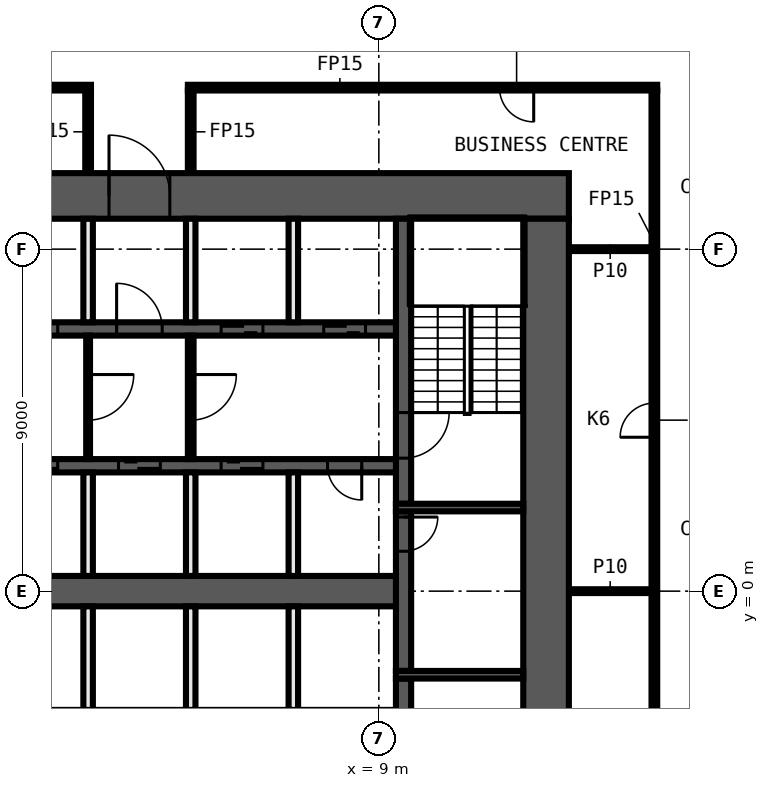
"""IFC4 building model, lengths in metres.
Left out: names, types, materials, properties, quantities, classifications, styles, units other than length and angle.
Written with IfcOpenShell. Run it as: python <this file> out.ifc"""

import sys

from ifc_helpers import new_model, si_unit, direction, frame, frame_2d, origin, place, context, subcontext, project, spatial, rectangle, extrude, element, fill, save


model = new_model("IFC4")
c1 = context("Model", 3, precision=1e-05, world=origin(), true_north=direction((0.0, 1.0)))
c2 = subcontext(c1, "Body", "Model", "MODEL_VIEW")
j1 = project(units=[si_unit("LENGTHUNIT", "METRE"), si_unit("PLANEANGLEUNIT", "RADIAN")], contexts=[c1])
p1 = place(None, origin())
s1 = spatial("IfcSite", under=j1, at=p1, CompositionType="ELEMENT")
p2 = place(p1, origin())
s2 = spatial("IfcBuilding", under=s1, at=p2, CompositionType="ELEMENT")
p3 = place(p2, frame((0.0, 0.0, 51.4)))
s3 = spatial("IfcBuildingStorey", under=s2, at=p3, CompositionType="ELEMENT", Elevation=51.4)
for number, where, z_axis, x_axis in (
    (1, (14.0, 0.0, 0.0), (0.0, 0.0, 1.0), (1.0, 0.0, 0.0)),
    (2, (14.0, 9.0, 0.0), (0.0, 0.0, 1.0), (1.0, 0.0, 0.0)),
):
    element("IfcWall", number, at=place(p3, frame(where, z_axis=z_axis, x_axis=x_axis)), inside=s3, PredefinedType="PARTITIONING", context=c2, shape_type="SweptSolid", body=[
        extrude(rectangle(XDim=2.175, YDim=0.1, at=frame_2d((1.087, 0.0))), origin(), (0.0, 0.0, 1.0), 3.3),
    ])
p4 = place(p3, frame((1.425, 13.25, 0.0), z_axis=(0.0, 0.0, 1.0), x_axis=(-1.0, 0.0, 0.0)))
e3 = element("IfcWall", 3, at=p4, inside=s3, PredefinedType="PARTITIONING", context=c2, shape_type="SweptSolid", body=[
    extrude(rectangle(XDim=17.75, YDim=0.15, at=frame_2d((8.875, 0.0))), origin(), (0.0, 0.0, 1.0), 3.3),
])
p5 = place(p4, frame((5.475, 0.0, 0.0)))
e4 = element("IfcOpeningElement", 4, at=p5, cuts=e3, PredefinedType="OPENING", context=c2, shape_type="SweptSolid", body=[
    extrude(rectangle(XDim=0.9, YDim=2.1, at=frame_2d((0.45, 1.05))), frame((0.0, 0.085, 0.0), z_axis=(0.0, -1.0, 0.0), x_axis=(1.0, 0.0, 0.0)), (0.0, 0.0, 1.0), 0.17),
])
p6 = place(p4, frame((13.6, 0.0, 0.0)))
e5 = element("IfcOpeningElement", 5, at=p6, cuts=e3, PredefinedType="OPENING", context=c2, shape_type="SweptSolid", body=[
    extrude(rectangle(XDim=0.9, YDim=2.1, at=frame_2d((0.45, 1.05))), frame((0.0, 0.085, 0.0), z_axis=(0.0, -1.0, 0.0), x_axis=(1.0, 0.0, 0.0)), (0.0, 0.0, 1.0), 0.17),
])
p7 = place(p3, frame((16.325, 13.25, 0.0), z_axis=(0.0, 0.0, 1.0), x_axis=(-1.0, 0.0, 0.0)))
e6 = element("IfcWall", 6, at=p7, inside=s3, PredefinedType="PARTITIONING", context=c2, shape_type="SweptSolid", body=[
    extrude(rectangle(XDim=12.35, YDim=0.15, at=frame_2d((6.175, 0.0))), origin(), (0.0, 0.0, 1.0), 3.3),
])
p8 = place(p7, frame((3.25, 0.0, 0.0)))
e7 = element("IfcOpeningElement", 7, at=p8, cuts=e6, PredefinedType="OPENING", context=c2, shape_type="SweptSolid", body=[
    extrude(rectangle(XDim=0.9, YDim=2.1, at=frame_2d((0.45, 1.05))), frame((0.0, 0.085, 0.0), z_axis=(0.0, -1.0, 0.0), x_axis=(1.0, 0.0, 0.0)), (0.0, 0.0, 1.0), 0.17),
])
p9 = place(p3, frame((16.25, -13.175, 0.0), z_axis=(0.0, 0.0, 1.0), x_axis=(0.0, 1.0, 0.0)))
e8 = element("IfcWall", 8, at=p9, inside=s3, PredefinedType="PARTITIONING", context=c2, shape_type="SweptSolid", body=[
    extrude(rectangle(XDim=26.35, YDim=0.15, at=frame_2d((13.175, 0.0))), origin(), (0.0, 0.0, 1.0), 3.3),
])
p10 = place(p9, frame((8.225, 0.0, 0.0)))
e9 = element("IfcOpeningElement", 9, at=p10, cuts=e8, PredefinedType="OPENING", context=c2, shape_type="SweptSolid", body=[
    extrude(rectangle(XDim=0.9, YDim=2.1, at=frame_2d((0.45, 1.05))), frame((0.0, 0.085, 0.0), z_axis=(0.0, -1.0, 0.0), x_axis=(1.0, 0.0, 0.0)), (0.0, 0.0, 1.0), 0.17),
])
p11 = place(p9, frame((17.225, 0.0, 0.0)))
e10 = element("IfcOpeningElement", 10, at=p11, cuts=e8, PredefinedType="OPENING", context=c2, shape_type="SweptSolid", body=[
    extrude(rectangle(XDim=0.9, YDim=2.1, at=frame_2d((0.45, 1.05))), frame((0.0, 0.085, 0.0), z_axis=(0.0, -1.0, 0.0), x_axis=(1.0, 0.0, 0.0)), (0.0, 0.0, 1.0), 0.17),
])
for number, where, z_axis, x_axis in (
    (11, (4.05, 11.0, 0.0), (0.0, 0.0, 1.0), (0.0, 1.0, 0.0)),
    (12, (1.35, 11.0, 0.0), (0.0, 0.0, 1.0), (0.0, 1.0, 0.0)),
):
    element("IfcWall", number, at=place(p3, frame(where, z_axis=z_axis, x_axis=x_axis)), inside=s3, PredefinedType="PARTITIONING", context=c2, shape_type="SweptSolid", body=[
        extrude(rectangle(XDim=2.175, YDim=0.15, at=frame_2d((1.087, 0.0))), origin(), (0.0, 0.0, 1.0), 3.3),
    ])
p12 = place(p3, frame((-14.0, 10.4, 0.0), z_axis=(0.0, 0.0, 1.0), x_axis=(1.0, 0.0, 0.0)))
e13 = element("IfcWall", 13, at=p12, inside=s3, PredefinedType="SHEAR", context=c2, shape_type="SweptSolid", body=[
    extrude(rectangle(XDim=28.0, YDim=1.2, at=frame_2d((14.0, 0.0))), origin(), (0.0, 0.0, 1.0), 3.3),
])
p13 = place(p12, frame((15.9, 0.0, 0.0)))
e14 = element("IfcOpeningElement", 14, at=p13, cuts=e13, PredefinedType="OPENING", context=c2, shape_type="SweptSolid", body=[
    extrude(rectangle(XDim=1.6, YDim=2.1, at=frame_2d((0.8, 1.05))), frame((0.0, 0.61, 0.0), z_axis=(0.0, -1.0, 0.0), x_axis=(1.0, 0.0, 0.0)), (0.0, 0.0, 1.0), 1.22),
])
p14 = place(p3, frame((13.4, 9.8, 0.0), z_axis=(0.0, 0.0, 1.0), x_axis=(0.0, -1.0, 0.0)))
e15 = element("IfcWall", 15, at=p14, inside=s3, PredefinedType="SHEAR", context=c2, shape_type="SweptSolid", body=[
    extrude(rectangle(XDim=19.6, YDim=1.2, at=frame_2d((9.8, 0.0))), origin(), (0.0, 0.0, 1.0), 3.3),
])
p15 = place(p3, frame((9.65, -2.3, 0.0), z_axis=(0.0, 0.0, 1.0), x_axis=(0.0, -1.0, 0.0)))
e16 = element("IfcWall", 16, at=p15, inside=s3, PredefinedType="SHEAR", context=c2, shape_type="SweptSolid", body=[
    extrude(rectangle(XDim=7.5, YDim=0.4, at=frame_2d((3.75, 0.0))), origin(), (0.0, 0.0, 1.0), 3.3),
])
p16 = place(p15, frame((1.2, 0.0, 0.0)))
e17 = element("IfcOpeningElement", 17, at=p16, cuts=e16, PredefinedType="OPENING", context=c2, shape_type="SweptSolid", body=[
    extrude(rectangle(XDim=1.2, YDim=2.1, at=frame_2d((0.6, 1.05))), frame((0.0, 0.21, 0.0), z_axis=(0.0, -1.0, 0.0), x_axis=(1.0, 0.0, 0.0)), (0.0, 0.0, 1.0), 0.42),
])
p17 = place(p3, frame((9.65, 2.1, 0.0), z_axis=(0.0, 0.0, 1.0), x_axis=(0.0, -1.0, 0.0)))
e18 = element("IfcWall", 18, at=p17, inside=s3, PredefinedType="SHEAR", context=c2, shape_type="SweptSolid", body=[
    extrude(rectangle(XDim=4.2, YDim=0.4, at=frame_2d((2.1, 0.0))), origin(), (0.0, 0.0, 1.0), 3.3),
])
p18 = place(p17, frame((0.15, 0.0, 0.0)))
e19 = element("IfcOpeningElement", 19, at=p18, cuts=e18, PredefinedType="OPENING", context=c2, shape_type="SweptSolid", body=[
    extrude(rectangle(XDim=0.9, YDim=2.1, at=frame_2d((0.45, 1.05))), frame((0.0, 0.21, 0.0), z_axis=(0.0, -1.0, 0.0), x_axis=(1.0, 0.0, 0.0)), (0.0, 0.0, 1.0), 0.42),
])
p19 = place(p3, frame((9.65, 9.8, 0.0), z_axis=(0.0, 0.0, 1.0), x_axis=(0.0, -1.0, 0.0)))
e20 = element("IfcWall", 20, at=p19, inside=s3, PredefinedType="SHEAR", context=c2, shape_type="SweptSolid", body=[
    extrude(rectangle(XDim=7.5, YDim=0.4, at=frame_2d((3.75, 0.0))), origin(), (0.0, 0.0, 1.0), 3.3),
])
p20 = place(p19, frame((5.1, 0.0, 0.0)))
e21 = element("IfcOpeningElement", 21, at=p20, cuts=e20, PredefinedType="OPENING", context=c2, shape_type="SweptSolid", body=[
    extrude(rectangle(XDim=1.2, YDim=2.1, at=frame_2d((0.6, 1.05))), frame((0.0, 0.21, 0.0), z_axis=(0.0, -1.0, 0.0), x_axis=(1.0, 0.0, 0.0)), (0.0, 0.0, 1.0), 0.42),
])
for number, where, z_axis, x_axis in (
    (22, (9.45, 2.2, 0.0), (0.0, 0.0, 1.0), (1.0, 0.0, 0.0)),
    (23, (9.45, -2.2, 0.0), (0.0, 0.0, 1.0), (1.0, 0.0, 0.0)),
):
    element("IfcWall", number, at=place(p3, frame(where, z_axis=z_axis, x_axis=x_axis)), inside=s3, PredefinedType="SHEAR", context=c2, shape_type="SweptSolid", body=[
        extrude(rectangle(XDim=3.35, YDim=0.2, at=frame_2d((1.675, 0.0))), origin(), (0.0, 0.0, 1.0), 3.3),
    ])
p21 = place(p3, frame((-9.45, 6.9, 0.0), z_axis=(0.0, 0.0, 1.0), x_axis=(1.0, 0.0, 0.0)))
e24 = element("IfcWall", 24, at=p21, inside=s3, PredefinedType="SHEAR", context=c2, shape_type="SweptSolid", body=[
    extrude(rectangle(XDim=18.9, YDim=0.35, at=frame_2d((9.45, 0.0))), origin(), (0.0, 0.0, 1.0), 3.3),
])
p22 = place(p21, frame((0.8, 0.0, 0.0)))
e25 = element("IfcOpeningElement", 25, at=p22, cuts=e24, PredefinedType="OPENING", context=c2, shape_type="SweptSolid", body=[
    extrude(rectangle(XDim=1.1, YDim=2.1, at=frame_2d((0.55, 1.05))), frame((0.0, 0.185, 0.0), z_axis=(0.0, -1.0, 0.0), x_axis=(1.0, 0.0, 0.0)), (0.0, 0.0, 1.0), 0.37),
])
p23 = place(p21, frame((3.5, 0.0, 0.0)))
e26 = element("IfcOpeningElement", 26, at=p23, cuts=e24, PredefinedType="OPENING", context=c2, shape_type="SweptSolid", body=[
    extrude(rectangle(XDim=1.1, YDim=2.1, at=frame_2d((0.55, 1.05))), frame((0.0, 0.185, 0.0), z_axis=(0.0, -1.0, 0.0), x_axis=(1.0, 0.0, 0.0)), (0.0, 0.0, 1.0), 0.37),
])
p24 = place(p21, frame((6.2, 0.0, 0.0)))
e27 = element("IfcOpeningElement", 27, at=p24, cuts=e24, PredefinedType="OPENING", context=c2, shape_type="SweptSolid", body=[
    extrude(rectangle(XDim=1.1, YDim=2.1, at=frame_2d((0.55, 1.05))), frame((0.0, 0.185, 0.0), z_axis=(0.0, -1.0, 0.0), x_axis=(1.0, 0.0, 0.0)), (0.0, 0.0, 1.0), 0.37),
])
p25 = place(p21, frame((8.9, 0.0, 0.0)))
e28 = element("IfcOpeningElement", 28, at=p25, cuts=e24, PredefinedType="OPENING", context=c2, shape_type="SweptSolid", body=[
    extrude(rectangle(XDim=1.1, YDim=2.1, at=frame_2d((0.55, 1.05))), frame((0.0, 0.185, 0.0), z_axis=(0.0, -1.0, 0.0), x_axis=(1.0, 0.0, 0.0)), (0.0, 0.0, 1.0), 0.37),
])
p26 = place(p21, frame((11.55, 0.0, 0.0)))
e29 = element("IfcOpeningElement", 29, at=p26, cuts=e24, PredefinedType="OPENING", context=c2, shape_type="SweptSolid", body=[
    extrude(rectangle(XDim=1.2, YDim=2.1, at=frame_2d((0.6, 1.05))), frame((0.0, 0.185, 0.0), z_axis=(0.0, -1.0, 0.0), x_axis=(1.0, 0.0, 0.0)), (0.0, 0.0, 1.0), 0.37),
])
p27 = place(p21, frame((14.3, 0.0, 0.0)))
e30 = element("IfcOpeningElement", 30, at=p27, cuts=e24, PredefinedType="OPENING", context=c2, shape_type="SweptSolid", body=[
    extrude(rectangle(XDim=1.1, YDim=2.1, at=frame_2d((0.55, 1.05))), frame((0.0, 0.185, 0.0), z_axis=(0.0, -1.0, 0.0), x_axis=(1.0, 0.0, 0.0)), (0.0, 0.0, 1.0), 0.37),
])
p28 = place(p21, frame((17.0, 0.0, 0.0)))
e31 = element("IfcOpeningElement", 31, at=p28, cuts=e24, PredefinedType="OPENING", context=c2, shape_type="SweptSolid", body=[
    extrude(rectangle(XDim=1.1, YDim=2.1, at=frame_2d((0.55, 1.05))), frame((0.0, 0.185, 0.0), z_axis=(0.0, -1.0, 0.0), x_axis=(1.0, 0.0, 0.0)), (0.0, 0.0, 1.0), 0.37),
])
p29 = place(p3, frame((9.45, 3.3, 0.0), z_axis=(0.0, 0.0, 1.0), x_axis=(-1.0, 0.0, 0.0)))
e32 = element("IfcWall", 32, at=p29, inside=s3, PredefinedType="SHEAR", context=c2, shape_type="SweptSolid", body=[
    extrude(rectangle(XDim=18.9, YDim=0.35, at=frame_2d((9.45, 0.0))), origin(), (0.0, 0.0, 1.0), 3.3),
])
p30 = place(p29, frame((17.0, 0.0, 0.0)))
e33 = element("IfcOpeningElement", 33, at=p30, cuts=e32, PredefinedType="OPENING", context=c2, shape_type="SweptSolid", body=[
    extrude(rectangle(XDim=1.1, YDim=2.1, at=frame_2d((0.55, 1.05))), frame((0.0, 0.185, 0.0), z_axis=(0.0, -1.0, 0.0), x_axis=(1.0, 0.0, 0.0)), (0.0, 0.0, 1.0), 0.37),
])
p31 = place(p29, frame((14.3, 0.0, 0.0)))
e34 = element("IfcOpeningElement", 34, at=p31, cuts=e32, PredefinedType="OPENING", context=c2, shape_type="SweptSolid", body=[
    extrude(rectangle(XDim=1.1, YDim=2.1, at=frame_2d((0.55, 1.05))), frame((0.0, 0.185, 0.0), z_axis=(0.0, -1.0, 0.0), x_axis=(1.0, 0.0, 0.0)), (0.0, 0.0, 1.0), 0.37),
])
p32 = place(p29, frame((11.6, 0.0, 0.0)))
e35 = element("IfcOpeningElement", 35, at=p32, cuts=e32, PredefinedType="OPENING", context=c2, shape_type="SweptSolid", body=[
    extrude(rectangle(XDim=1.1, YDim=2.1, at=frame_2d((0.55, 1.05))), frame((0.0, 0.185, 0.0), z_axis=(0.0, -1.0, 0.0), x_axis=(1.0, 0.0, 0.0)), (0.0, 0.0, 1.0), 0.37),
])
p33 = place(p29, frame((8.9, 0.0, 0.0)))
e36 = element("IfcOpeningElement", 36, at=p33, cuts=e32, PredefinedType="OPENING", context=c2, shape_type="SweptSolid", body=[
    extrude(rectangle(XDim=1.1, YDim=2.1, at=frame_2d((0.55, 1.05))), frame((0.0, 0.185, 0.0), z_axis=(0.0, -1.0, 0.0), x_axis=(1.0, 0.0, 0.0)), (0.0, 0.0, 1.0), 0.37),
])
p34 = place(p29, frame((6.2, 0.0, 0.0)))
e37 = element("IfcOpeningElement", 37, at=p34, cuts=e32, PredefinedType="OPENING", context=c2, shape_type="SweptSolid", body=[
    extrude(rectangle(XDim=1.1, YDim=2.1, at=frame_2d((0.55, 1.05))), frame((0.0, 0.185, 0.0), z_axis=(0.0, -1.0, 0.0), x_axis=(1.0, 0.0, 0.0)), (0.0, 0.0, 1.0), 0.37),
])
p35 = place(p29, frame((3.5, 0.0, 0.0)))
e38 = element("IfcOpeningElement", 38, at=p35, cuts=e32, PredefinedType="OPENING", context=c2, shape_type="SweptSolid", body=[
    extrude(rectangle(XDim=1.1, YDim=2.1, at=frame_2d((0.55, 1.05))), frame((0.0, 0.185, 0.0), z_axis=(0.0, -1.0, 0.0), x_axis=(1.0, 0.0, 0.0)), (0.0, 0.0, 1.0), 0.37),
])
p36 = place(p29, frame((0.9, 0.0, 0.0)))
e39 = element("IfcOpeningElement", 39, at=p36, cuts=e32, PredefinedType="OPENING", context=c2, shape_type="SweptSolid", body=[
    extrude(rectangle(XDim=0.9, YDim=2.1, at=frame_2d((0.45, 1.05))), frame((0.0, 0.185, 0.0), z_axis=(0.0, -1.0, 0.0), x_axis=(1.0, 0.0, 0.0)), (0.0, 0.0, 1.0), 0.37),
])
p37 = place(p3, frame((-9.45, 0.0, 0.0), z_axis=(0.0, 0.0, 1.0), x_axis=(1.0, 0.0, 0.0)))
e40 = element("IfcWall", 40, at=p37, inside=s3, PredefinedType="SHEAR", context=c2, shape_type="SweptSolid", body=[
    extrude(rectangle(XDim=18.9, YDim=0.8, at=frame_2d((9.45, 0.0))), origin(), (0.0, 0.0, 1.0), 3.3),
])
for number, where, z_axis, x_axis in (
    (41, (6.75, -3.125, 0.0), (0.0, 0.0, 1.0), (0.0, 1.0, 0.0)),
    (42, (6.75, 0.4, 0.0), (0.0, 0.0, 1.0), (0.0, 1.0, 0.0)),
    (43, (6.75, 7.075, 0.0), (0.0, 0.0, 1.0), (0.0, 1.0, 0.0)),
):
    element("IfcWall", number, at=place(p3, frame(where, z_axis=z_axis, x_axis=x_axis)), inside=s3, PredefinedType="SOLIDWALL", context=c2, shape_type="SweptSolid", body=[
        extrude(rectangle(XDim=2.725, YDim=0.25, at=frame_2d((1.363, 0.0))), origin(), (0.0, 0.0, 1.0), 3.3),
    ])
p38 = place(p3, frame((4.05, 6.725, 0.0), z_axis=(0.0, 0.0, 1.0), x_axis=(0.0, -1.0, 0.0)))
e44 = element("IfcWall", 44, at=p38, inside=s3, PredefinedType="PARTITIONING", context=c2, shape_type="SweptSolid", body=[
    extrude(rectangle(XDim=3.25, YDim=0.15, at=frame_2d((1.625, 0.0))), origin(), (0.0, 0.0, 1.0), 3.3),
])
p39 = place(p38, frame((1.025, 0.0, 0.0)))
e45 = element("IfcOpeningElement", 45, at=p39, cuts=e44, PredefinedType="OPENING", context=c2, shape_type="SweptSolid", body=[
    extrude(rectangle(XDim=1.2, YDim=2.1, at=frame_2d((0.6, 1.05))), frame((0.0, 0.085, 0.0), z_axis=(0.0, -1.0, 0.0), x_axis=(1.0, 0.0, 0.0)), (0.0, 0.0, 1.0), 0.17),
])
for number, where, z_axis, x_axis in (
    (46, (4.05, -3.125, 0.0), (0.0, 0.0, 1.0), (0.0, 1.0, 0.0)),
    (47, (4.05, 0.4, 0.0), (0.0, 0.0, 1.0), (0.0, 1.0, 0.0)),
    (48, (4.05, 7.075, 0.0), (0.0, 0.0, 1.0), (0.0, 1.0, 0.0)),
):
    element("IfcWall", number, at=place(p3, frame(where, z_axis=z_axis, x_axis=x_axis)), inside=s3, PredefinedType="SOLIDWALL", context=c2, shape_type="SweptSolid", body=[
        extrude(rectangle(XDim=2.725, YDim=0.25, at=frame_2d((1.363, 0.0))), origin(), (0.0, 0.0, 1.0), 3.3),
    ])
p40 = place(p3, frame((1.35, 6.725, 0.0), z_axis=(0.0, 0.0, 1.0), x_axis=(0.0, -1.0, 0.0)))
e49 = element("IfcWall", 49, at=p40, inside=s3, PredefinedType="PARTITIONING", context=c2, shape_type="SweptSolid", body=[
    extrude(rectangle(XDim=3.25, YDim=0.1, at=frame_2d((1.625, 0.0))), origin(), (0.0, 0.0, 1.0), 3.3),
])
p41 = place(p40, frame((1.025, 0.0, 0.0)))
e50 = element("IfcOpeningElement", 50, at=p41, cuts=e49, PredefinedType="OPENING", context=c2, shape_type="SweptSolid", body=[
    extrude(rectangle(XDim=1.2, YDim=2.1, at=frame_2d((0.6, 1.05))), frame((0.0, 0.06, 0.0), z_axis=(0.0, -1.0, 0.0), x_axis=(1.0, 0.0, 0.0)), (0.0, 0.0, 1.0), 0.12),
])
for number, where, z_axis, x_axis in (
    (51, (1.35, -3.125, 0.0), (0.0, 0.0, 1.0), (0.0, 1.0, 0.0)),
    (52, (1.35, 0.4, 0.0), (0.0, 0.0, 1.0), (0.0, 1.0, 0.0)),
    (53, (1.35, 7.075, 0.0), (0.0, 0.0, 1.0), (0.0, 1.0, 0.0)),
):
    element("IfcWall", number, at=place(p3, frame(where, z_axis=z_axis, x_axis=x_axis)), inside=s3, PredefinedType="SOLIDWALL", context=c2, shape_type="SweptSolid", body=[
        extrude(rectangle(XDim=2.725, YDim=0.25, at=frame_2d((1.363, 0.0))), origin(), (0.0, 0.0, 1.0), 3.3),
    ])
p42 = place(p11, origin())
e54 = element("IfcDoor", 54, at=p42, inside=s3, OperationType="SINGLE_SWING_RIGHT", PredefinedType="DOOR", context=c2, shape_type="SweptSolid", body=[
    extrude(rectangle(XDim=0.9, YDim=2.1, at=frame_2d((0.45, 1.05))), frame((0.0, 0.025, 0.0), z_axis=(0.0, -1.0, 0.0), x_axis=(1.0, 0.0, 0.0)), (0.0, 0.0, 1.0), 0.05),
])
fill(e10, e54)
p43 = place(p8, origin())
e55 = element("IfcDoor", 55, at=p43, inside=s3, OperationType="SINGLE_SWING_LEFT", PredefinedType="DOOR", context=c2, shape_type="SweptSolid", body=[
    extrude(rectangle(XDim=0.9, YDim=2.1, at=frame_2d((0.45, 1.05))), frame((0.0, 0.025, 0.0), z_axis=(0.0, -1.0, 0.0), x_axis=(1.0, 0.0, 0.0)), (0.0, 0.0, 1.0), 0.05),
])
fill(e7, e55)
p44 = place(p18, origin())
e56 = element("IfcDoor", 56, at=p44, inside=s3, OperationType="SINGLE_SWING_RIGHT", PredefinedType="DOOR", context=c2, shape_type="SweptSolid", body=[
    extrude(rectangle(XDim=0.9, YDim=2.1, at=frame_2d((0.45, 1.05))), frame((0.0, 0.025, 0.0), z_axis=(0.0, -1.0, 0.0), x_axis=(1.0, 0.0, 0.0)), (0.0, 0.0, 1.0), 0.05),
])
fill(e19, e56)
p45 = place(p25, origin())
e57 = element("IfcDoor", 57, at=p45, inside=s3, OperationType="DOUBLE_DOOR_SLIDING", PredefinedType="DOOR", context=c2, shape_type="SweptSolid", body=[
    extrude(rectangle(XDim=1.1, YDim=2.1, at=frame_2d((0.55, 1.05))), frame((0.0, 0.025, 0.0), z_axis=(0.0, -1.0, 0.0), x_axis=(1.0, 0.0, 0.0)), (0.0, 0.0, 1.0), 0.05),
])
fill(e28, e57)
p46 = place(p13, origin())
e58 = element("IfcDoor", 58, at=p46, inside=s3, OperationType="DOUBLE_DOOR_SINGLE_SWING", PredefinedType="DOOR", context=c2, shape_type="SweptSolid", body=[
    extrude(rectangle(XDim=1.6, YDim=2.1, at=frame_2d((0.8, 1.05))), frame((0.0, 0.025, 0.0), z_axis=(0.0, -1.0, 0.0), x_axis=(1.0, 0.0, 0.0)), (0.0, 0.0, 1.0), 0.05),
])
fill(e14, e58)
p47 = place(p26, origin())
e59 = element("IfcDoor", 59, at=p47, inside=s3, OperationType="SINGLE_SWING_LEFT", PredefinedType="DOOR", context=c2, shape_type="SweptSolid", body=[
    extrude(rectangle(XDim=1.2, YDim=2.1, at=frame_2d((0.6, 1.05))), frame((0.0, 0.025, 0.0), z_axis=(0.0, -1.0, 0.0), x_axis=(1.0, 0.0, 0.0)), (0.0, 0.0, 1.0), 0.05),
])
fill(e29, e59)
p48 = place(p27, origin())
e60 = element("IfcDoor", 60, at=p48, inside=s3, OperationType="DOUBLE_DOOR_SLIDING", PredefinedType="DOOR", context=c2, shape_type="SweptSolid", body=[
    extrude(rectangle(XDim=1.1, YDim=2.1, at=frame_2d((0.55, 1.05))), frame((0.0, 0.025, 0.0), z_axis=(0.0, -1.0, 0.0), x_axis=(1.0, 0.0, 0.0)), (0.0, 0.0, 1.0), 0.05),
])
fill(e30, e60)
p49 = place(p28, origin())
e61 = element("IfcDoor", 61, at=p49, inside=s3, OperationType="DOUBLE_DOOR_SLIDING", PredefinedType="DOOR", context=c2, shape_type="SweptSolid", body=[
    extrude(rectangle(XDim=1.1, YDim=2.1, at=frame_2d((0.55, 1.05))), frame((0.0, 0.025, 0.0), z_axis=(0.0, -1.0, 0.0), x_axis=(1.0, 0.0, 0.0)), (0.0, 0.0, 1.0), 0.05),
])
fill(e31, e61)
p50 = place(p33, origin())
e62 = element("IfcDoor", 62, at=p50, inside=s3, OperationType="DOUBLE_DOOR_SLIDING", PredefinedType="DOOR", context=c2, shape_type="SweptSolid", body=[
    extrude(rectangle(XDim=1.1, YDim=2.1, at=frame_2d((0.55, 1.05))), frame((0.0, 0.025, 0.0), z_axis=(0.0, -1.0, 0.0), x_axis=(1.0, 0.0, 0.0)), (0.0, 0.0, 1.0), 0.05),
])
fill(e36, e62)
p51 = place(p34, origin())
e63 = element("IfcDoor", 63, at=p51, inside=s3, OperationType="DOUBLE_DOOR_SLIDING", PredefinedType="DOOR", context=c2, shape_type="SweptSolid", body=[
    extrude(rectangle(XDim=1.1, YDim=2.1, at=frame_2d((0.55, 1.05))), frame((0.0, 0.025, 0.0), z_axis=(0.0, -1.0, 0.0), x_axis=(1.0, 0.0, 0.0)), (0.0, 0.0, 1.0), 0.05),
])
fill(e37, e63)
p52 = place(p35, origin())
e64 = element("IfcDoor", 64, at=p52, inside=s3, OperationType="DOUBLE_DOOR_SLIDING", PredefinedType="DOOR", context=c2, shape_type="SweptSolid", body=[
    extrude(rectangle(XDim=1.1, YDim=2.1, at=frame_2d((0.55, 1.05))), frame((0.0, 0.025, 0.0), z_axis=(0.0, -1.0, 0.0), x_axis=(1.0, 0.0, 0.0)), (0.0, 0.0, 1.0), 0.05),
])
fill(e38, e64)
p53 = place(p36, origin())
e65 = element("IfcDoor", 65, at=p53, inside=s3, OperationType="SINGLE_SWING_LEFT", PredefinedType="DOOR", context=c2, shape_type="SweptSolid", body=[
    extrude(rectangle(XDim=0.9, YDim=2.1, at=frame_2d((0.45, 1.05))), frame((0.0, 0.025, 0.0), z_axis=(0.0, -1.0, 0.0), x_axis=(1.0, 0.0, 0.0)), (0.0, 0.0, 1.0), 0.05),
])
fill(e39, e65)
p54 = place(p20, origin())
e66 = element("IfcDoor", 66, at=p54, inside=s3, OperationType="SINGLE_SWING_LEFT", PredefinedType="DOOR", context=c2, shape_type="SweptSolid", body=[
    extrude(rectangle(XDim=1.2, YDim=2.1, at=frame_2d((0.6, 1.05))), frame((0.0, 0.025, 0.0), z_axis=(0.0, -1.0, 0.0), x_axis=(1.0, 0.0, 0.0)), (0.0, 0.0, 1.0), 0.05),
])
fill(e21, e66)
p55 = place(p41, origin())
e67 = element("IfcDoor", 67, at=p55, inside=s3, OperationType="SINGLE_SWING_LEFT", PredefinedType="DOOR", context=c2, shape_type="SweptSolid", body=[
    extrude(rectangle(XDim=1.2, YDim=2.1, at=frame_2d((0.6, 1.05))), frame((0.0, 0.025, 0.0), z_axis=(0.0, -1.0, 0.0), x_axis=(1.0, 0.0, 0.0)), (0.0, 0.0, 1.0), 0.05),
])
fill(e50, e67)
p56 = place(p39, origin())
e68 = element("IfcDoor", 68, at=p56, inside=s3, OperationType="SINGLE_SWING_RIGHT", PredefinedType="DOOR", context=c2, shape_type="SweptSolid", body=[
    extrude(rectangle(XDim=1.2, YDim=2.1, at=frame_2d((0.6, 1.05))), frame((0.0, 0.025, 0.0), z_axis=(0.0, -1.0, 0.0), x_axis=(1.0, 0.0, 0.0)), (0.0, 0.0, 1.0), 0.05),
])
fill(e45, e68)
save(model, sys.argv[1])
